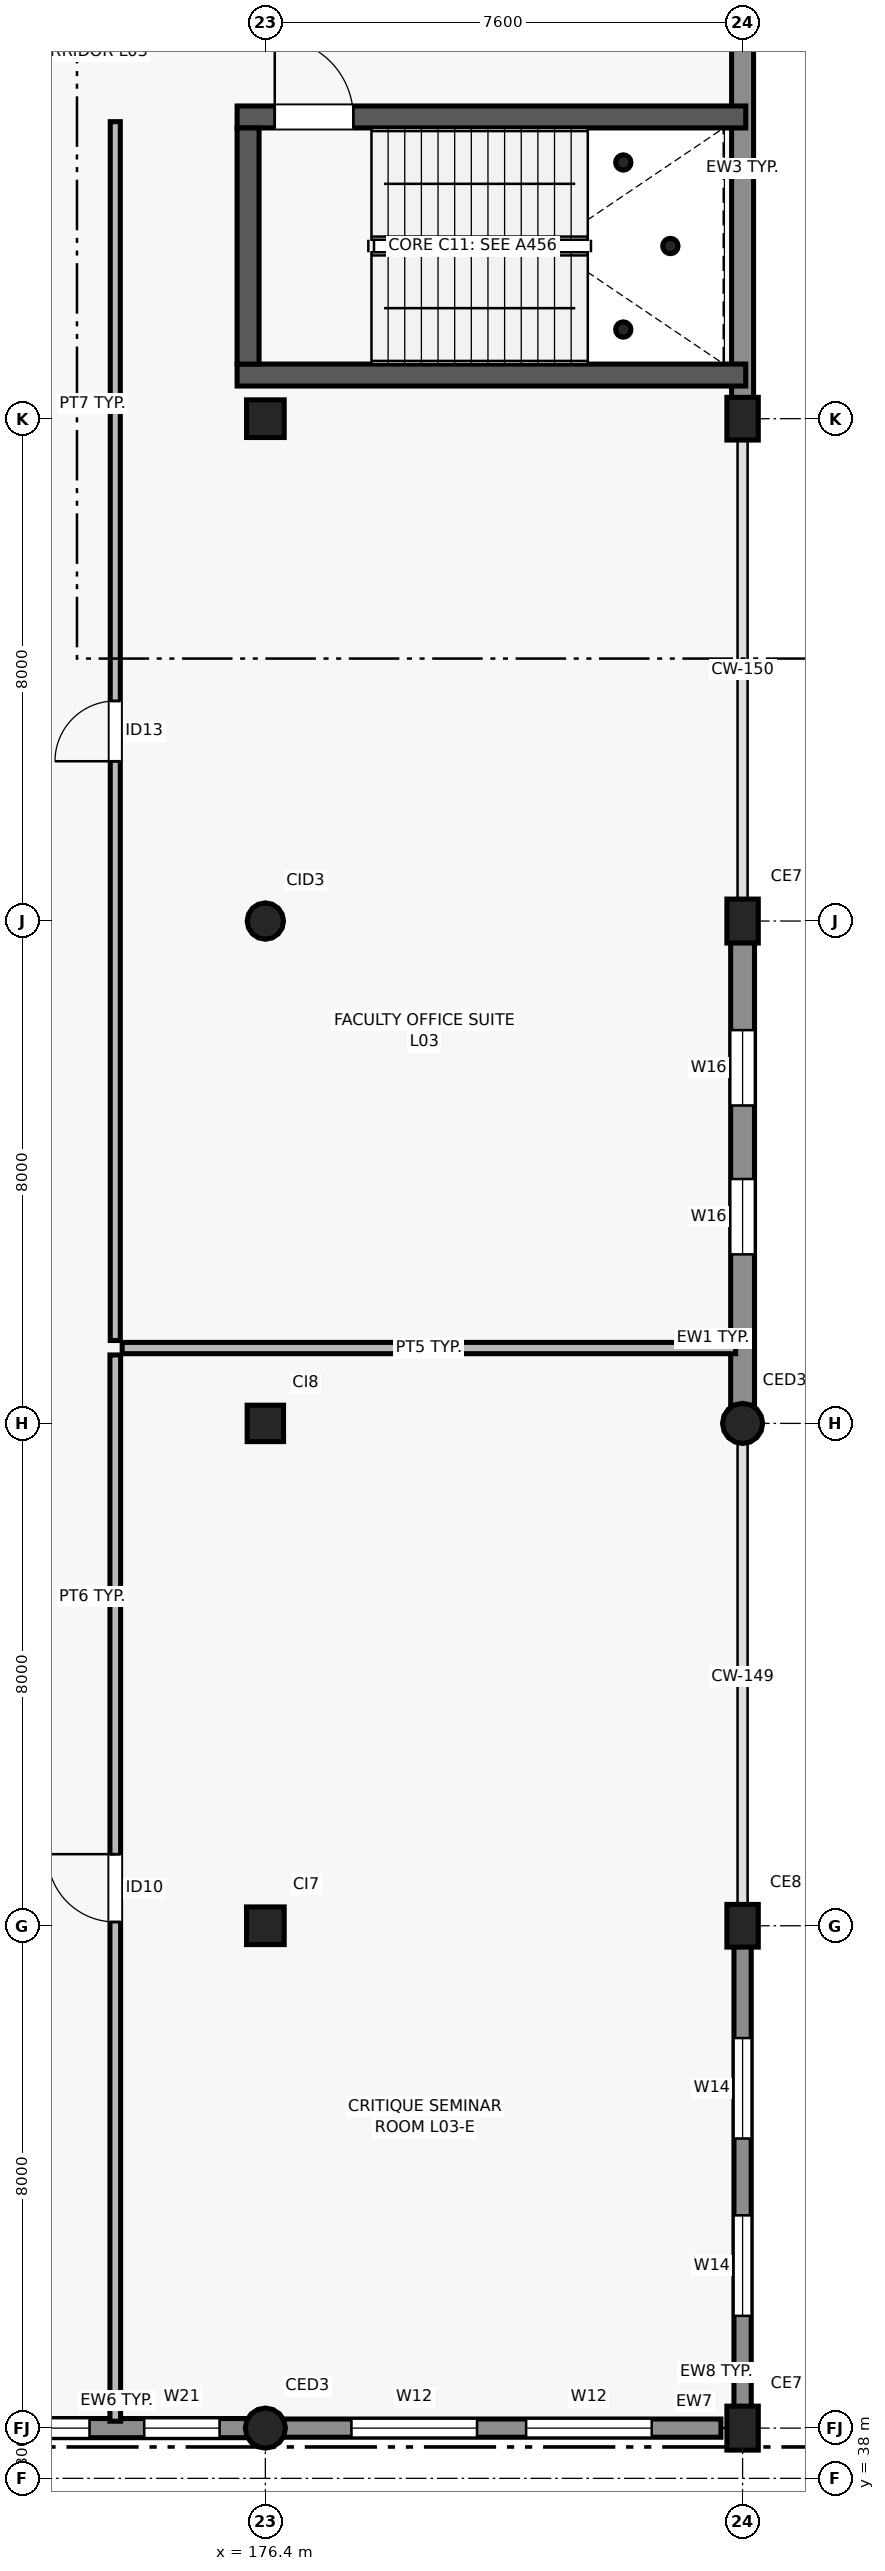
"""IFC4 building model, lengths in metres.
Left out: names, types, materials, properties, quantities, classifications, styles, units other than length and angle.
Written with IfcOpenShell. Run it as: python <this file> out.ifc"""

import sys

from ifc_helpers import new_model, si_unit, direction, frame, frame_2d, origin, origin_2d, place, context, subcontext, project, spatial, rectangle, circle, hollow_circle, extrude, element, fill, save


model = new_model("IFC4")
c1 = context("Model", 3, precision=1e-05, world=origin(), true_north=direction((0.0, 1.0)))
c2 = subcontext(c1, "Body", "Model", "MODEL_VIEW")
j1 = project(units=[si_unit("LENGTHUNIT", "METRE"), si_unit("PLANEANGLEUNIT", "RADIAN")], contexts=[c1])
p1 = place(None, origin())
s1 = spatial("IfcSite", under=j1, at=p1, CompositionType="ELEMENT")
p2 = place(p1, origin())
s2 = spatial("IfcBuilding", under=s1, at=p2, CompositionType="ELEMENT")
p3 = place(p2, frame((0.0, 0.0, 13.2)))
s3 = spatial("IfcBuildingStorey", under=s2, at=p3, CompositionType="ELEMENT", Elevation=13.2)
p4 = place(p3, frame((176.4, 38.8, 0.0), z_axis=(0.0, 0.0, 1.0), x_axis=(1.0, 0.0, 0.0)))
e1 = element("IfcColumn", 1, at=p4, inside=s3, PredefinedType="COLUMN", context=c2, shape_type="SweptSolid", body=[
    extrude(circle(Radius=0.32, at=origin_2d()), origin(), (0.0, 0.0, 1.0), 4.2),
])
p5 = place(p3, frame((176.4, 46.8, 0.0), z_axis=(0.0, 0.0, 1.0), x_axis=(1.0, 0.0, 0.0)))
e2 = element("IfcColumn", 2, at=p5, inside=s3, PredefinedType="COLUMN", context=c2, shape_type="SweptSolid", body=[
    extrude(rectangle(XDim=0.6, YDim=0.6, at=origin_2d()), origin(), (0.0, 0.0, 1.0), 4.2),
])
p6 = place(p3, frame((176.4, 54.8, 0.0), z_axis=(0.0, 0.0, 1.0), x_axis=(1.0, 0.0, 0.0)))
e3 = element("IfcColumn", 3, at=p6, inside=s3, PredefinedType="COLUMN", context=c2, shape_type="SweptSolid", body=[
    extrude(rectangle(XDim=0.58, YDim=0.58, at=origin_2d()), origin(), (0.0, 0.0, 1.0), 4.2),
])
p7 = place(p3, frame((176.4, 62.8, 0.0), z_axis=(0.0, 0.0, 1.0), x_axis=(1.0, 0.0, 0.0)))
e4 = element("IfcColumn", 4, at=p7, inside=s3, PredefinedType="COLUMN", context=c2, shape_type="SweptSolid", body=[
    extrude(circle(Radius=0.29, at=origin_2d()), origin(), (0.0, 0.0, 1.0), 4.2),
])
p8 = place(p3, frame((176.4, 70.8, 0.0), z_axis=(0.0, 0.0, 1.0), x_axis=(1.0, 0.0, 0.0)))
e5 = element("IfcColumn", 5, at=p8, inside=s3, PredefinedType="COLUMN", context=c2, shape_type="SweptSolid", body=[
    extrude(rectangle(XDim=0.6, YDim=0.6, at=origin_2d()), origin(), (0.0, 0.0, 1.0), 4.2),
])
p9 = place(p3, frame((184.0, 38.8, 0.0), z_axis=(0.0, 0.0, 1.0), x_axis=(1.0, 0.0, 0.0)))
e6 = element("IfcColumn", 6, at=p9, inside=s3, PredefinedType="COLUMN", context=c2, shape_type="SweptSolid", body=[
    extrude(rectangle(XDim=0.7, YDim=0.5, at=origin_2d()), origin(), (0.0, 0.0, 1.0), 4.2),
])
p10 = place(p3, frame((184.0, 46.8, 0.0), z_axis=(0.0, 0.0, 1.0), x_axis=(1.0, 0.0, 0.0)))
e7 = element("IfcColumn", 7, at=p10, inside=s3, PredefinedType="COLUMN", context=c2, shape_type="SweptSolid", body=[
    extrude(rectangle(XDim=0.68, YDim=0.5, at=origin_2d()), origin(), (0.0, 0.0, 1.0), 4.2),
])
p11 = place(p3, frame((184.0, 54.8, 0.0), z_axis=(0.0, 0.0, 1.0), x_axis=(1.0, 0.0, 0.0)))
e8 = element("IfcColumn", 8, at=p11, inside=s3, PredefinedType="COLUMN", context=c2, shape_type="SweptSolid", body=[
    extrude(circle(Radius=0.32, at=origin_2d()), origin(), (0.0, 0.0, 1.0), 4.2),
])
p12 = place(p3, frame((184.0, 62.8, 0.0), z_axis=(0.0, 0.0, 1.0), x_axis=(1.0, 0.0, 0.0)))
e9 = element("IfcColumn", 9, at=p12, inside=s3, PredefinedType="COLUMN", context=c2, shape_type="SweptSolid", body=[
    extrude(rectangle(XDim=0.7, YDim=0.5, at=origin_2d()), origin(), (0.0, 0.0, 1.0), 4.2),
])
p13 = place(p3, frame((184.0, 70.8, 0.0), z_axis=(0.0, 0.0, 1.0), x_axis=(1.0, 0.0, 0.0)))
e10 = element("IfcColumn", 10, at=p13, inside=s3, PredefinedType="COLUMN", context=c2, shape_type="SweptSolid", body=[
    extrude(rectangle(XDim=0.68, YDim=0.5, at=origin_2d()), origin(), (0.0, 0.0, 1.0), 4.2),
])
p14 = place(p3, frame((169.135, 38.8, 0.0), z_axis=(0.0, 0.0, 1.0), x_axis=(1.0, 0.0, 0.0)))
e11 = element("IfcWall", 11, at=p14, inside=s3, PredefinedType="SOLIDWALL", context=c2, shape_type="SweptSolid", body=[
    extrude(rectangle(XDim=6.996, YDim=0.305, at=frame_2d((3.498, 0.0))), origin(), (0.0, 0.0, 1.0), 3.36),
])
p15 = place(p14, frame((0.328, 0.0, 0.9)))
e12 = element("IfcOpeningElement", 12, at=p15, cuts=e11, PredefinedType="OPENING", context=c2, shape_type="SweptSolid", body=[
    extrude(rectangle(XDim=1.4, YDim=1.5, at=frame_2d((0.7, 0.75))), frame((0.0, 0.162, 0.0), z_axis=(0.0, -1.0, 0.0), x_axis=(1.0, 0.0, 0.0)), (0.0, 0.0, 1.0), 0.325),
])
p16 = place(p14, frame((2.465, 0.0, 0.9)))
e13 = element("IfcOpeningElement", 13, at=p16, cuts=e11, PredefinedType="OPENING", context=c2, shape_type="SweptSolid", body=[
    extrude(rectangle(XDim=2.0, YDim=1.8, at=frame_2d((1.0, 0.9))), frame((0.0, 0.162, 0.0), z_axis=(0.0, -1.0, 0.0), x_axis=(1.0, 0.0, 0.0)), (0.0, 0.0, 1.0), 0.325),
])
p17 = place(p14, frame((5.336, 0.0, 0.9)))
e14 = element("IfcOpeningElement", 14, at=p17, cuts=e11, PredefinedType="OPENING", context=c2, shape_type="SweptSolid", body=[
    extrude(rectangle(XDim=1.2, YDim=1.25, at=frame_2d((0.6, 0.625))), frame((0.0, 0.162, 0.0), z_axis=(0.0, -1.0, 0.0), x_axis=(1.0, 0.0, 0.0)), (0.0, 0.0, 1.0), 0.325),
])
p18 = place(p3, frame((176.669, 38.8, 0.0), z_axis=(0.0, 0.0, 1.0), x_axis=(1.0, 0.0, 0.0)))
e15 = element("IfcWall", 15, at=p18, inside=s3, PredefinedType="SOLIDWALL", context=c2, shape_type="SweptSolid", body=[
    extrude(rectangle(XDim=6.986, YDim=0.29, at=frame_2d((3.493, 0.0))), origin(), (0.0, 0.0, 1.0), 3.28),
])
p19 = place(p18, frame((1.102, 0.0, 0.9)))
e16 = element("IfcOpeningElement", 16, at=p19, cuts=e15, PredefinedType="OPENING", context=c2, shape_type="SweptSolid", body=[
    extrude(rectangle(XDim=2.0, YDim=1.5, at=frame_2d((1.0, 0.75))), frame((0.0, 0.155, 0.0), z_axis=(0.0, -1.0, 0.0), x_axis=(1.0, 0.0, 0.0)), (0.0, 0.0, 1.0), 0.31),
])
p20 = place(p18, frame((3.884, 0.0, 0.9)))
e17 = element("IfcOpeningElement", 17, at=p20, cuts=e15, PredefinedType="OPENING", context=c2, shape_type="SweptSolid", body=[
    extrude(rectangle(XDim=2.0, YDim=1.5, at=frame_2d((1.0, 0.75))), frame((0.0, 0.155, 0.0), z_axis=(0.0, -1.0, 0.0), x_axis=(1.0, 0.0, 0.0)), (0.0, 0.0, 1.0), 0.31),
])
p21 = place(p3, frame((184.0, 39.045, 0.0), z_axis=(0.0, 0.0, 1.0), x_axis=(0.0, 1.0, 0.0)))
e18 = element("IfcWall", 18, at=p21, inside=s3, PredefinedType="SOLIDWALL", context=c2, shape_type="SweptSolid", body=[
    extrude(rectangle(XDim=7.51, YDim=0.275, at=frame_2d((3.755, 0.0))), origin(), (0.0, 0.0, 1.0), 3.5),
])
p22 = place(p21, frame((1.543, 0.0, 0.9)))
e19 = element("IfcOpeningElement", 19, at=p22, cuts=e18, PredefinedType="OPENING", context=c2, shape_type="SweptSolid", body=[
    extrude(rectangle(XDim=1.6, YDim=1.5, at=frame_2d((0.8, 0.75))), frame((0.0, 0.147, 0.0), z_axis=(0.0, -1.0, 0.0), x_axis=(1.0, 0.0, 0.0)), (0.0, 0.0, 1.0), 0.295),
])
p23 = place(p21, frame((4.367, 0.0, 0.9)))
e20 = element("IfcOpeningElement", 20, at=p23, cuts=e18, PredefinedType="OPENING", context=c2, shape_type="SweptSolid", body=[
    extrude(rectangle(XDim=1.6, YDim=1.5, at=frame_2d((0.8, 0.75))), frame((0.0, 0.147, 0.0), z_axis=(0.0, -1.0, 0.0), x_axis=(1.0, 0.0, 0.0)), (0.0, 0.0, 1.0), 0.295),
])
p24 = place(p3, frame((184.0, 55.069, 0.0), z_axis=(0.0, 0.0, 1.0), x_axis=(0.0, 1.0, 0.0)))
e21 = element("IfcWall", 21, at=p24, inside=s3, PredefinedType="SOLIDWALL", context=c2, shape_type="SweptSolid", body=[
    extrude(rectangle(XDim=7.486, YDim=0.38, at=frame_2d((3.743, 0.0))), origin(), (0.0, 0.0, 1.0), 3.34),
])
p25 = place(p24, frame((2.423, 0.0, 0.9)))
e22 = element("IfcOpeningElement", 22, at=p25, cuts=e21, PredefinedType="OPENING", context=c2, shape_type="SweptSolid", body=[
    extrude(rectangle(XDim=1.2, YDim=1.5, at=frame_2d((0.6, 0.75))), frame((0.0, 0.2, 0.0), z_axis=(0.0, -1.0, 0.0), x_axis=(1.0, 0.0, 0.0)), (0.0, 0.0, 1.0), 0.4),
])
p26 = place(p24, frame((4.794, 0.0, 0.9)))
e23 = element("IfcOpeningElement", 23, at=p26, cuts=e21, PredefinedType="OPENING", context=c2, shape_type="SweptSolid", body=[
    extrude(rectangle(XDim=1.2, YDim=1.5, at=frame_2d((0.6, 0.75))), frame((0.0, 0.2, 0.0), z_axis=(0.0, -1.0, 0.0), x_axis=(1.0, 0.0, 0.0)), (0.0, 0.0, 1.0), 0.4),
])
p27 = place(p3, frame((184.0, 71.045, 0.0), z_axis=(0.0, 0.0, 1.0), x_axis=(0.0, 1.0, 0.0)))
e24 = element("IfcWall", 24, at=p27, inside=s3, PredefinedType="SOLIDWALL", context=c2, shape_type="SweptSolid", body=[
    extrude(rectangle(XDim=7.486, YDim=0.35, at=frame_2d((3.743, 0.0))), origin(), (0.0, 0.0, 1.0), 3.92),
])
for number, where, z_axis, x_axis in (
    (25, (182.1, 72.22, 0.0), (0.0, 0.0, 1.0), (1.0, 0.0, 0.0)),
    (26, (182.1, 74.88, 0.0), (0.0, 0.0, 1.0), (1.0, 0.0, 0.0)),
    (27, (182.85, 73.55, 0.0), (0.0, 0.0, 1.0), (1.0, 0.0, 0.0)),
):
    element("IfcColumn", number, at=place(p3, frame(where, z_axis=z_axis, x_axis=x_axis)), inside=s3, PredefinedType="COLUMN", context=c2, shape_type="SweptSolid", body=[
        extrude(hollow_circle(Radius=0.122, WallThickness=0.01, at=origin_2d()), origin(), (0.0, 0.0, 1.0), 4.2),
    ])
p28 = place(p3, frame((175.95, 71.495, 0.0), z_axis=(0.0, 0.0, 1.0), x_axis=(1.0, 0.0, 0.0)))
e28 = element("IfcWall", 28, at=p28, inside=s3, PredefinedType="SHEAR", context=c2, shape_type="SweptSolid", body=[
    extrude(rectangle(XDim=8.1, YDim=0.35, at=frame_2d((4.05, 0.0))), origin(), (0.0, 0.0, 1.0), 3.92),
])
p29 = place(p3, frame((175.95, 75.605, 0.0), z_axis=(0.0, 0.0, 1.0), x_axis=(1.0, 0.0, 0.0)))
e29 = element("IfcWall", 29, at=p29, inside=s3, PredefinedType="SHEAR", context=c2, shape_type="SweptSolid", body=[
    extrude(rectangle(XDim=8.1, YDim=0.35, at=frame_2d((4.05, 0.0))), origin(), (0.0, 0.0, 1.0), 3.92),
])
p30 = place(p29, frame((0.6, 0.0, 0.0)))
e30 = element("IfcOpeningElement", 30, at=p30, cuts=e29, PredefinedType="OPENING", context=c2, shape_type="SweptSolid", body=[
    extrude(rectangle(XDim=1.25, YDim=2.2, at=frame_2d((0.625, 1.1))), frame((0.0, 0.185, 0.0), z_axis=(0.0, -1.0, 0.0), x_axis=(1.0, 0.0, 0.0)), (0.0, 0.0, 1.0), 0.37),
])
p31 = place(p3, frame((176.125, 71.67, 0.0), z_axis=(0.0, 0.0, 1.0), x_axis=(0.0, 1.0, 0.0)))
e31 = element("IfcWall", 31, at=p31, inside=s3, PredefinedType="SHEAR", context=c2, shape_type="SweptSolid", body=[
    extrude(rectangle(XDim=3.76, YDim=0.35, at=frame_2d((1.88, 0.0))), origin(), (0.0, 0.0, 1.0), 3.92),
])
p32 = place(p3, frame((174.12, 56.0, 0.0), z_axis=(0.0, 0.0, 1.0), x_axis=(1.0, 0.0, 0.0)))
e32 = element("IfcWall", 32, at=p32, inside=s3, PredefinedType="PARTITIONING", context=c2, shape_type="SweptSolid", body=[
    extrude(rectangle(XDim=9.77, YDim=0.18, at=frame_2d((4.885, 0.0))), origin(), (0.0, 0.0, 1.0), 3.9),
])
p33 = place(p3, frame((174.01, 38.91, 0.0), z_axis=(0.0, 0.0, 1.0), x_axis=(0.0, 1.0, 0.0)))
e33 = element("IfcWall", 33, at=p33, inside=s3, PredefinedType="PARTITIONING", context=c2, shape_type="SweptSolid", body=[
    extrude(rectangle(XDim=16.98, YDim=0.17, at=frame_2d((8.49, 0.0))), origin(), (0.0, 0.0, 1.0), 3.9),
])
p34 = place(p33, frame((7.95, 0.0, 0.0)))
e34 = element("IfcOpeningElement", 34, at=p34, cuts=e33, PredefinedType="OPENING", context=c2, shape_type="SweptSolid", body=[
    extrude(rectangle(XDim=1.08, YDim=2.15, at=frame_2d((0.54, 1.075))), frame((0.0, 0.095, 0.0), z_axis=(0.0, -1.0, 0.0), x_axis=(1.0, 0.0, 0.0)), (0.0, 0.0, 1.0), 0.19),
])
p35 = place(p3, frame((174.01, 56.12, 0.0), z_axis=(0.0, 0.0, 1.0), x_axis=(0.0, 1.0, 0.0)))
e35 = element("IfcWall", 35, at=p35, inside=s3, PredefinedType="PARTITIONING", context=c2, shape_type="SweptSolid", body=[
    extrude(rectangle(XDim=19.41, YDim=0.16, at=frame_2d((9.705, 0.0))), origin(), (0.0, 0.0, 1.0), 3.9),
])
p36 = place(p35, frame((9.225, 0.0, 0.0)))
e36 = element("IfcOpeningElement", 36, at=p36, cuts=e35, PredefinedType="OPENING", context=c2, shape_type="SweptSolid", body=[
    extrude(rectangle(XDim=0.96, YDim=2.15, at=frame_2d((0.48, 1.075))), frame((0.0, 0.09, 0.0), z_axis=(0.0, -1.0, 0.0), x_axis=(1.0, 0.0, 0.0)), (0.0, 0.0, 1.0), 0.18),
])
p37 = place(p16, origin())
e37 = element("IfcWindow", 37, at=p37, inside=s3, PartitioningType="SINGLE_PANEL", PredefinedType="WINDOW", context=c2, shape_type="SweptSolid", body=[
    extrude(rectangle(XDim=2.0, YDim=1.8, at=frame_2d((1.0, 0.9))), frame((0.0, 0.03, 0.0), z_axis=(0.0, -1.0, 0.0), x_axis=(1.0, 0.0, 0.0)), (0.0, 0.0, 1.0), 0.06),
])
fill(e13, e37)
p38 = place(p17, origin())
e38 = element("IfcWindow", 38, at=p38, inside=s3, PartitioningType="SINGLE_PANEL", PredefinedType="WINDOW", context=c2, shape_type="SweptSolid", body=[
    extrude(rectangle(XDim=1.2, YDim=1.25, at=frame_2d((0.6, 0.625))), frame((0.0, 0.03, 0.0), z_axis=(0.0, -1.0, 0.0), x_axis=(1.0, 0.0, 0.0)), (0.0, 0.0, 1.0), 0.06),
])
fill(e14, e38)
p39 = place(p19, origin())
e39 = element("IfcWindow", 39, at=p39, inside=s3, PartitioningType="SINGLE_PANEL", PredefinedType="WINDOW", context=c2, shape_type="SweptSolid", body=[
    extrude(rectangle(XDim=2.0, YDim=1.5, at=frame_2d((1.0, 0.75))), frame((0.0, 0.03, 0.0), z_axis=(0.0, -1.0, 0.0), x_axis=(1.0, 0.0, 0.0)), (0.0, 0.0, 1.0), 0.06),
])
fill(e16, e39)
p40 = place(p20, origin())
e40 = element("IfcWindow", 40, at=p40, inside=s3, PartitioningType="SINGLE_PANEL", PredefinedType="WINDOW", context=c2, shape_type="SweptSolid", body=[
    extrude(rectangle(XDim=2.0, YDim=1.5, at=frame_2d((1.0, 0.75))), frame((0.0, 0.03, 0.0), z_axis=(0.0, -1.0, 0.0), x_axis=(1.0, 0.0, 0.0)), (0.0, 0.0, 1.0), 0.06),
])
fill(e17, e40)
p41 = place(p22, origin())
e41 = element("IfcWindow", 41, at=p41, inside=s3, PartitioningType="SINGLE_PANEL", PredefinedType="WINDOW", context=c2, shape_type="SweptSolid", body=[
    extrude(rectangle(XDim=1.6, YDim=1.5, at=frame_2d((0.8, 0.75))), frame((0.0, 0.03, 0.0), z_axis=(0.0, -1.0, 0.0), x_axis=(1.0, 0.0, 0.0)), (0.0, 0.0, 1.0), 0.06),
])
fill(e19, e41)
p42 = place(p23, origin())
e42 = element("IfcWindow", 42, at=p42, inside=s3, PartitioningType="SINGLE_PANEL", PredefinedType="WINDOW", context=c2, shape_type="SweptSolid", body=[
    extrude(rectangle(XDim=1.6, YDim=1.5, at=frame_2d((0.8, 0.75))), frame((0.0, 0.03, 0.0), z_axis=(0.0, -1.0, 0.0), x_axis=(1.0, 0.0, 0.0)), (0.0, 0.0, 1.0), 0.06),
])
fill(e20, e42)
p43 = place(p25, origin())
e43 = element("IfcWindow", 43, at=p43, inside=s3, PartitioningType="SINGLE_PANEL", PredefinedType="WINDOW", context=c2, shape_type="SweptSolid", body=[
    extrude(rectangle(XDim=1.2, YDim=1.5, at=frame_2d((0.6, 0.75))), frame((0.0, 0.03, 0.0), z_axis=(0.0, -1.0, 0.0), x_axis=(1.0, 0.0, 0.0)), (0.0, 0.0, 1.0), 0.06),
])
fill(e22, e43)
p44 = place(p26, origin())
e44 = element("IfcWindow", 44, at=p44, inside=s3, PartitioningType="SINGLE_PANEL", PredefinedType="WINDOW", context=c2, shape_type="SweptSolid", body=[
    extrude(rectangle(XDim=1.2, YDim=1.5, at=frame_2d((0.6, 0.75))), frame((0.0, 0.03, 0.0), z_axis=(0.0, -1.0, 0.0), x_axis=(1.0, 0.0, 0.0)), (0.0, 0.0, 1.0), 0.06),
])
fill(e23, e44)
p45 = place(p30, origin())
e45 = element("IfcDoor", 45, at=p45, inside=s3, OperationType="SINGLE_SWING_LEFT", PredefinedType="DOOR", context=c2, shape_type="SweptSolid", body=[
    extrude(rectangle(XDim=1.25, YDim=2.2, at=frame_2d((0.625, 1.1))), frame((0.0, 0.025, 0.0), z_axis=(0.0, -1.0, 0.0), x_axis=(1.0, 0.0, 0.0)), (0.0, 0.0, 1.0), 0.05),
])
fill(e30, e45)
p46 = place(p34, origin())
e46 = element("IfcDoor", 46, at=p46, inside=s3, OperationType="SINGLE_SWING_RIGHT", PredefinedType="DOOR", context=c2, shape_type="SweptSolid", body=[
    extrude(rectangle(XDim=1.08, YDim=2.15, at=frame_2d((0.54, 1.075))), frame((0.0, 0.025, 0.0), z_axis=(0.0, -1.0, 0.0), x_axis=(1.0, 0.0, 0.0)), (0.0, 0.0, 1.0), 0.05),
])
fill(e34, e46)
p47 = place(p36, origin())
e47 = element("IfcDoor", 47, at=p47, inside=s3, OperationType="SINGLE_SWING_LEFT", PredefinedType="DOOR", context=c2, shape_type="SweptSolid", body=[
    extrude(rectangle(XDim=0.96, YDim=2.15, at=frame_2d((0.48, 1.075))), frame((0.0, 0.025, 0.0), z_axis=(0.0, -1.0, 0.0), x_axis=(1.0, 0.0, 0.0)), (0.0, 0.0, 1.0), 0.05),
])
fill(e36, e47)
save(model, sys.argv[1])
